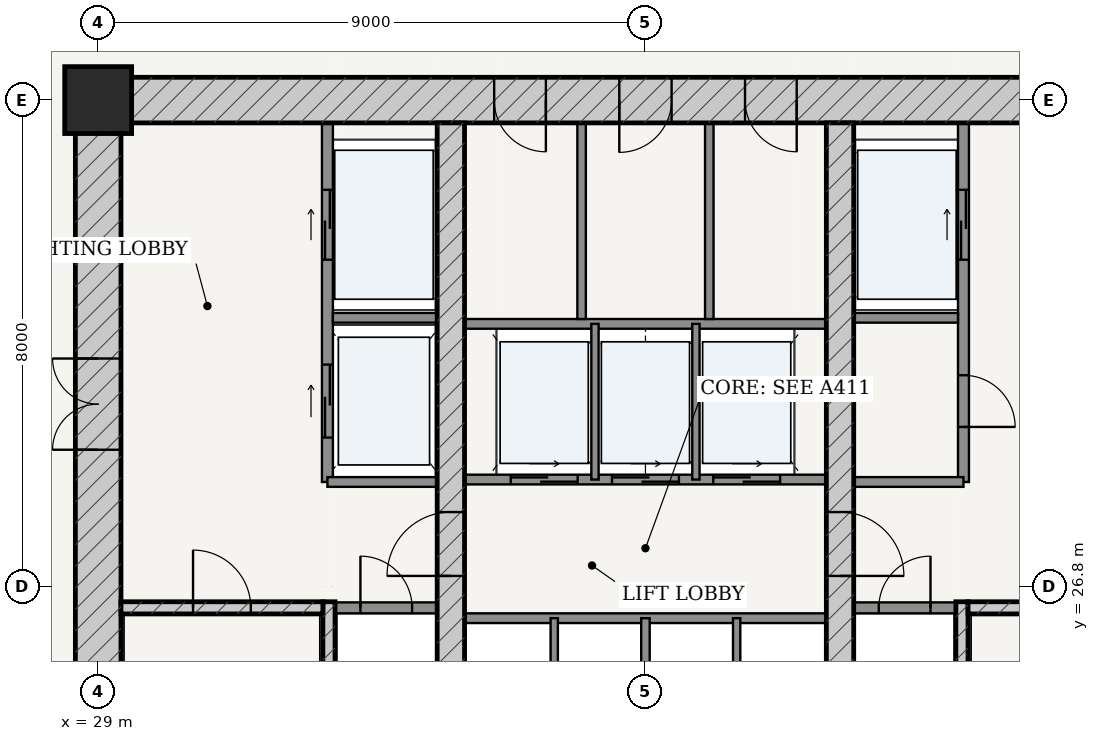
"""IFC4 building model, lengths in metres.
Left out: names, types, materials, properties, quantities, classifications, styles, units other than length and angle.
Written with IfcOpenShell. Run it as: python <this file> out.ifc"""

import sys

from ifc_helpers import new_model, si_unit, direction, frame, frame_2d, origin, origin_2d, place, context, subcontext, project, spatial, rectangle, extrude, source, transform, mapped, element, fill, save


model = new_model("IFC4")
c1 = context("Model", 3, precision=1e-05, world=origin(), true_north=direction((-0.2419218956, 0.970295726276)))
c2 = subcontext(c1, "Body", "Model", "MODEL_VIEW")
j1 = project(units=[si_unit("LENGTHUNIT", "METRE"), si_unit("PLANEANGLEUNIT", "RADIAN")], contexts=[c1])
p1 = place(None, origin())
s1 = spatial("IfcSite", under=j1, at=p1, CompositionType="ELEMENT")
p2 = place(p1, origin())
s2 = spatial("IfcBuilding", under=s1, at=p2, CompositionType="ELEMENT")
p3 = place(p2, frame((0.0, 0.0, 49.2)))
s3 = spatial("IfcBuildingStorey", under=s2, at=p3, CompositionType="ELEMENT", Elevation=49.2)
p4 = place(p3, frame((29.0, 34.8, 0.0), z_axis=(0.0, 0.0, 1.0), x_axis=(1.0, 0.0, 0.0)))
e1 = element("IfcColumn", 1, at=p4, inside=s3, PredefinedType="COLUMN", context=c2, shape_type="SweptSolid", body=[
    extrude(rectangle(XDim=1.1, YDim=1.1, at=origin_2d()), origin(), (0.0, 0.0, 1.0), 3.6),
])
p5 = place(p3, frame((28.625, 34.8, 0.0), z_axis=(0.0, 0.0, 1.0), x_axis=(1.0, 0.0, 0.0)))
e2 = element("IfcWall", 2, at=p5, inside=s3, PredefinedType="SHEAR", context=c2, shape_type="SweptSolid", body=[
    extrude(rectangle(XDim=18.75, YDim=0.75, at=frame_2d((9.375, 0.0))), origin(), (0.0, 0.0, 1.0), 3.32),
])
p6 = place(p5, frame((6.887, 0.0, 0.0)))
e3 = element("IfcOpeningElement", 3, at=p6, cuts=e2, PredefinedType="OPENING", context=c2, shape_type="SweptSolid", body=[
    extrude(rectangle(XDim=0.85, YDim=2.1, at=frame_2d((0.425, 1.05))), frame((0.0, 0.385, 0.0), z_axis=(0.0, -1.0, 0.0), x_axis=(1.0, 0.0, 0.0)), (0.0, 0.0, 1.0), 0.77),
])
p7 = place(p5, frame((8.945, 0.0, 0.0)))
e4 = element("IfcOpeningElement", 4, at=p7, cuts=e2, PredefinedType="OPENING", context=c2, shape_type="SweptSolid", body=[
    extrude(rectangle(XDim=0.86, YDim=2.1, at=frame_2d((0.43, 1.05))), frame((0.0, 0.385, 0.0), z_axis=(0.0, -1.0, 0.0), x_axis=(1.0, 0.0, 0.0)), (0.0, 0.0, 1.0), 0.77),
])
p8 = place(p5, frame((11.012, 0.0, 0.0)))
e5 = element("IfcOpeningElement", 5, at=p8, cuts=e2, PredefinedType="OPENING", context=c2, shape_type="SweptSolid", body=[
    extrude(rectangle(XDim=0.85, YDim=2.1, at=frame_2d((0.425, 1.05))), frame((0.0, 0.385, 0.0), z_axis=(0.0, -1.0, 0.0), x_axis=(1.0, 0.0, 0.0)), (0.0, 0.0, 1.0), 0.77),
])
p9 = place(p3, frame((29.0, 19.175, 0.0), z_axis=(0.0, 0.0, 1.0), x_axis=(0.0, 1.0, 0.0)))
e6 = element("IfcWall", 6, at=p9, inside=s3, PredefinedType="SHEAR", context=c2, shape_type="SweptSolid", body=[
    extrude(rectangle(XDim=15.25, YDim=0.75, at=frame_2d((7.625, 0.0))), origin(), (0.0, 0.0, 1.0), 3.32),
])
p10 = place(p9, frame((9.875, 0.0, 0.0)))
e7 = element("IfcOpeningElement", 7, at=p10, cuts=e6, PredefinedType="OPENING", context=c2, shape_type="SweptSolid", body=[
    extrude(rectangle(XDim=1.5, YDim=2.2, at=frame_2d((0.75, 1.1))), frame((0.0, 0.385, 0.0), z_axis=(0.0, -1.0, 0.0), x_axis=(1.0, 0.0, 0.0)), (0.0, 0.0, 1.0), 0.77),
])
p11 = place(p3, frame((32.795, 19.175, 0.0), z_axis=(0.0, 0.0, 1.0), x_axis=(0.0, 1.0, 0.0)))
e8 = element("IfcWall", 8, at=p11, inside=s3, PredefinedType="SOLIDWALL", context=c2, shape_type="SweptSolid", body=[
    extrude(rectangle(XDim=7.375, YDim=0.2, at=frame_2d((3.688, 0.0))), origin(), (0.0, 0.0, 1.0), 3.32),
])
p12 = place(p3, frame((29.375, 26.45, 0.0), z_axis=(0.0, 0.0, 1.0), x_axis=(1.0, 0.0, 0.0)))
e9 = element("IfcWall", 9, at=p12, inside=s3, PredefinedType="SOLIDWALL", context=c2, shape_type="SweptSolid", body=[
    extrude(rectangle(XDim=3.32, YDim=0.2, at=frame_2d((1.66, 0.0))), origin(), (0.0, 0.0, 1.0), 3.32),
])
p13 = place(p12, frame((1.185, 0.0, 0.0)))
e10 = element("IfcOpeningElement", 10, at=p13, cuts=e9, PredefinedType="OPENING", context=c2, shape_type="SweptSolid", body=[
    extrude(rectangle(XDim=0.95, YDim=2.15, at=frame_2d((0.475, 1.075))), frame((0.0, 0.11, 0.0), z_axis=(0.0, -1.0, 0.0), x_axis=(1.0, 0.0, 0.0)), (0.0, 0.0, 1.0), 0.22),
])
p14 = place(p3, frame((43.205, 19.175, 0.0), z_axis=(0.0, 0.0, 1.0), x_axis=(0.0, 1.0, 0.0)))
e11 = element("IfcWall", 11, at=p14, inside=s3, PredefinedType="SOLIDWALL", context=c2, shape_type="SweptSolid", body=[
    extrude(rectangle(XDim=7.375, YDim=0.2, at=frame_2d((3.688, 0.0))), origin(), (0.0, 0.0, 1.0), 3.32),
])
p15 = place(p3, frame((43.305, 26.45, 0.0), z_axis=(0.0, 0.0, 1.0), x_axis=(1.0, 0.0, 0.0)))
e12 = element("IfcWall", 12, at=p15, inside=s3, PredefinedType="SOLIDWALL", context=c2, shape_type="SweptSolid", body=[
    extrude(rectangle(XDim=3.32, YDim=0.2, at=frame_2d((1.66, 0.0))), origin(), (0.0, 0.0, 1.0), 3.32),
])
p16 = place(p15, frame((1.185, 0.0, 0.0)))
e13 = element("IfcOpeningElement", 13, at=p16, cuts=e12, PredefinedType="OPENING", context=c2, shape_type="SweptSolid", body=[
    extrude(rectangle(XDim=0.95, YDim=2.15, at=frame_2d((0.475, 1.075))), frame((0.0, 0.11, 0.0), z_axis=(0.0, -1.0, 0.0), x_axis=(1.0, 0.0, 0.0)), (0.0, 0.0, 1.0), 0.22),
])
p17 = place(p3, frame((34.8, 19.175, 0.0), z_axis=(0.0, 0.0, 1.0), x_axis=(0.0, 1.0, 0.0)))
e14 = element("IfcWall", 14, at=p17, inside=s3, PredefinedType="SHEAR", context=c2, shape_type="SweptSolid", body=[
    extrude(rectangle(XDim=15.25, YDim=0.45, at=frame_2d((7.625, 0.0))), origin(), (0.0, 0.0, 1.0), 3.32),
])
p18 = place(p17, frame((7.8, 0.0, 0.0)))
e15 = element("IfcOpeningElement", 15, at=p18, cuts=e14, PredefinedType="OPENING", context=c2, shape_type="SweptSolid", body=[
    extrude(rectangle(XDim=1.05, YDim=2.15, at=frame_2d((0.525, 1.075))), frame((0.0, 0.235, 0.0), z_axis=(0.0, -1.0, 0.0), x_axis=(1.0, 0.0, 0.0)), (0.0, 0.0, 1.0), 0.47),
])
p19 = place(p3, frame((41.2, 19.175, 0.0), z_axis=(0.0, 0.0, 1.0), x_axis=(0.0, 1.0, 0.0)))
e16 = element("IfcWall", 16, at=p19, inside=s3, PredefinedType="SHEAR", context=c2, shape_type="SweptSolid", body=[
    extrude(rectangle(XDim=15.25, YDim=0.45, at=frame_2d((7.625, 0.0))), origin(), (0.0, 0.0, 1.0), 3.32),
])
p20 = place(p19, frame((7.8, 0.0, 0.0)))
e17 = element("IfcOpeningElement", 17, at=p20, cuts=e16, PredefinedType="OPENING", context=c2, shape_type="SweptSolid", body=[
    extrude(rectangle(XDim=1.05, YDim=2.15, at=frame_2d((0.525, 1.075))), frame((0.0, 0.235, 0.0), z_axis=(0.0, -1.0, 0.0), x_axis=(1.0, 0.0, 0.0)), (0.0, 0.0, 1.0), 0.47),
])
p21 = place(p3, frame((32.9, 26.45, 0.0), z_axis=(0.0, 0.0, 1.0), x_axis=(1.0, 0.0, 0.0)))
e18 = element("IfcWall", 18, at=p21, inside=s3, PredefinedType="PARTITIONING", context=c2, shape_type="SweptSolid", body=[
    extrude(rectangle(XDim=1.675, YDim=0.18, at=frame_2d((0.837, 0.0))), origin(), (0.0, 0.0, 1.0), 3.32),
])
p22 = place(p21, frame((0.413, 0.0, 0.0)))
e19 = element("IfcOpeningElement", 19, at=p22, cuts=e18, PredefinedType="OPENING", context=c2, shape_type="SweptSolid", body=[
    extrude(rectangle(XDim=0.85, YDim=2.1, at=frame_2d((0.425, 1.05))), frame((0.0, 0.1, 0.0), z_axis=(0.0, -1.0, 0.0), x_axis=(1.0, 0.0, 0.0)), (0.0, 0.0, 1.0), 0.2),
])
p23 = place(p3, frame((41.425, 26.45, 0.0), z_axis=(0.0, 0.0, 1.0), x_axis=(1.0, 0.0, 0.0)))
e20 = element("IfcWall", 20, at=p23, inside=s3, PredefinedType="PARTITIONING", context=c2, shape_type="SweptSolid", body=[
    extrude(rectangle(XDim=1.675, YDim=0.18, at=frame_2d((0.837, 0.0))), origin(), (0.0, 0.0, 1.0), 3.32),
])
p24 = place(p23, frame((0.413, 0.0, 0.0)))
e21 = element("IfcOpeningElement", 21, at=p24, cuts=e20, PredefinedType="OPENING", context=c2, shape_type="SweptSolid", body=[
    extrude(rectangle(XDim=0.85, YDim=2.1, at=frame_2d((0.425, 1.05))), frame((0.0, 0.1, 0.0), z_axis=(0.0, -1.0, 0.0), x_axis=(1.0, 0.0, 0.0)), (0.0, 0.0, 1.0), 0.2),
])
p25 = place(p3, frame((32.77, 28.52, 0.0), z_axis=(0.0, 0.0, 1.0), x_axis=(0.0, 1.0, 0.0)))
e22 = element("IfcWall", 22, at=p25, inside=s3, PredefinedType="PARTITIONING", context=c2, shape_type="SweptSolid", body=[
    extrude(rectangle(XDim=5.905, YDim=0.18, at=frame_2d((2.953, 0.0))), origin(), (0.0, 0.0, 1.0), 3.32),
])
p26 = place(p25, frame((3.655, 0.0, 0.0)))
e23 = element("IfcOpeningElement", 23, at=p26, cuts=e22, PredefinedType="OPENING", context=c2, shape_type="SweptSolid", body=[
    extrude(rectangle(XDim=1.15, YDim=2.2, at=frame_2d((0.575, 1.1))), frame((0.0, 0.1, 0.0), z_axis=(0.0, -1.0, 0.0), x_axis=(1.0, 0.0, 0.0)), (0.0, 0.0, 1.0), 0.2),
])
p27 = place(p25, frame((0.73, 0.0, 0.0)))
e24 = element("IfcOpeningElement", 24, at=p27, cuts=e22, PredefinedType="OPENING", context=c2, shape_type="SweptSolid", body=[
    extrude(rectangle(XDim=1.2, YDim=2.25, at=frame_2d((0.6, 1.125))), frame((0.0, 0.1, 0.0), z_axis=(0.0, -1.0, 0.0), x_axis=(1.0, 0.0, 0.0)), (0.0, 0.0, 1.0), 0.2),
])
p28 = place(p3, frame((32.86, 31.22, 0.0), z_axis=(0.0, 0.0, 1.0), x_axis=(1.0, 0.0, 0.0)))
e25 = element("IfcWall", 25, at=p28, inside=s3, PredefinedType="PARTITIONING", context=c2, shape_type="SweptSolid", body=[
    extrude(rectangle(XDim=1.715, YDim=0.16, at=frame_2d((0.857, 0.0))), origin(), (0.0, 0.0, 1.0), 3.32),
])
p29 = place(p3, frame((32.77, 28.52, 0.0), z_axis=(0.0, 0.0, 1.0), x_axis=(1.0, 0.0, 0.0)))
e26 = element("IfcWall", 26, at=p29, inside=s3, PredefinedType="PARTITIONING", context=c2, shape_type="SweptSolid", body=[
    extrude(rectangle(XDim=1.805, YDim=0.16, at=frame_2d((0.902, 0.0))), origin(), (0.0, 0.0, 1.0), 3.32),
])
p30 = place(p3, frame((43.23, 28.52, 0.0), z_axis=(0.0, 0.0, 1.0), x_axis=(0.0, 1.0, 0.0)))
e27 = element("IfcWall", 27, at=p30, inside=s3, PredefinedType="PARTITIONING", context=c2, shape_type="SweptSolid", body=[
    extrude(rectangle(XDim=5.905, YDim=0.18, at=frame_2d((2.953, 0.0))), origin(), (0.0, 0.0, 1.0), 3.32),
])
p31 = place(p30, frame((0.905, 0.0, 0.0)))
e28 = element("IfcOpeningElement", 28, at=p31, cuts=e27, PredefinedType="OPENING", context=c2, shape_type="SweptSolid", body=[
    extrude(rectangle(XDim=0.85, YDim=2.1, at=frame_2d((0.425, 1.05))), frame((0.0, 0.1, 0.0), z_axis=(0.0, -1.0, 0.0), x_axis=(1.0, 0.0, 0.0)), (0.0, 0.0, 1.0), 0.2),
])
p32 = place(p30, frame((3.655, 0.0, 0.0)))
e29 = element("IfcOpeningElement", 29, at=p32, cuts=e27, PredefinedType="OPENING", context=c2, shape_type="SweptSolid", body=[
    extrude(rectangle(XDim=1.15, YDim=2.2, at=frame_2d((0.575, 1.1))), frame((0.0, 0.1, 0.0), z_axis=(0.0, -1.0, 0.0), x_axis=(1.0, 0.0, 0.0)), (0.0, 0.0, 1.0), 0.2),
])
p33 = place(p3, frame((41.425, 31.22, 0.0), z_axis=(0.0, 0.0, 1.0), x_axis=(1.0, 0.0, 0.0)))
e30 = element("IfcWall", 30, at=p33, inside=s3, PredefinedType="PARTITIONING", context=c2, shape_type="SweptSolid", body=[
    extrude(rectangle(XDim=1.715, YDim=0.16, at=frame_2d((0.857, 0.0))), origin(), (0.0, 0.0, 1.0), 3.32),
])
p34 = place(p3, frame((41.425, 28.52, 0.0), z_axis=(0.0, 0.0, 1.0), x_axis=(1.0, 0.0, 0.0)))
e31 = element("IfcWall", 31, at=p34, inside=s3, PredefinedType="PARTITIONING", context=c2, shape_type="SweptSolid", body=[
    extrude(rectangle(XDim=1.805, YDim=0.16, at=frame_2d((0.902, 0.0))), origin(), (0.0, 0.0, 1.0), 3.32),
])
p35 = place(p3, frame((35.025, 28.56, 0.0), z_axis=(0.0, 0.0, 1.0), x_axis=(1.0, 0.0, 0.0)))
e32 = element("IfcWall", 32, at=p35, inside=s3, PredefinedType="PARTITIONING", context=c2, shape_type="SweptSolid", body=[
    extrude(rectangle(XDim=5.95, YDim=0.16, at=frame_2d((2.975, 0.0))), origin(), (0.0, 0.0, 1.0), 3.32),
])
p36 = place(p35, frame((0.76, 0.0, 0.0)))
e33 = element("IfcOpeningElement", 33, at=p36, cuts=e32, PredefinedType="OPENING", context=c2, shape_type="SweptSolid", body=[
    extrude(rectangle(XDim=1.1, YDim=2.2, at=frame_2d((0.55, 1.1))), frame((0.0, 0.09, 0.0), z_axis=(0.0, -1.0, 0.0), x_axis=(1.0, 0.0, 0.0)), (0.0, 0.0, 1.0), 0.18),
])
p37 = place(p35, frame((2.425, 0.0, 0.0)))
e34 = element("IfcOpeningElement", 34, at=p37, cuts=e32, PredefinedType="OPENING", context=c2, shape_type="SweptSolid", body=[
    extrude(rectangle(XDim=1.1, YDim=2.2, at=frame_2d((0.55, 1.1))), frame((0.0, 0.09, 0.0), z_axis=(0.0, -1.0, 0.0), x_axis=(1.0, 0.0, 0.0)), (0.0, 0.0, 1.0), 0.18),
])
p38 = place(p35, frame((4.09, 0.0, 0.0)))
e35 = element("IfcOpeningElement", 35, at=p38, cuts=e32, PredefinedType="OPENING", context=c2, shape_type="SweptSolid", body=[
    extrude(rectangle(XDim=1.1, YDim=2.2, at=frame_2d((0.55, 1.1))), frame((0.0, 0.09, 0.0), z_axis=(0.0, -1.0, 0.0), x_axis=(1.0, 0.0, 0.0)), (0.0, 0.0, 1.0), 0.18),
])
p39 = place(p3, frame((35.025, 31.12, 0.0), z_axis=(0.0, 0.0, 1.0), x_axis=(1.0, 0.0, 0.0)))
e36 = element("IfcWall", 36, at=p39, inside=s3, PredefinedType="PARTITIONING", context=c2, shape_type="SweptSolid", body=[
    extrude(rectangle(XDim=5.95, YDim=0.16, at=frame_2d((2.975, 0.0))), origin(), (0.0, 0.0, 1.0), 3.32),
])
for number, where, z_axis, x_axis in (
    (37, (37.17, 28.56, 0.0), (0.0, 0.0, 1.0), (0.0, 1.0, 0.0)),
    (38, (38.83, 28.56, 0.0), (0.0, 0.0, 1.0), (0.0, 1.0, 0.0)),
):
    element("IfcWall", number, at=place(p3, frame(where, z_axis=z_axis, x_axis=x_axis)), inside=s3, PredefinedType="PARTITIONING", context=c2, shape_type="SweptSolid", body=[
        extrude(rectangle(XDim=2.56, YDim=0.12, at=frame_2d((1.28, 0.0))), origin(), (0.0, 0.0, 1.0), 3.32),
    ])
for number, where, z_axis, x_axis in (
    (39, (36.95, 31.2, 0.0), (0.0, 0.0, 1.0), (0.0, 1.0, 0.0)),
    (40, (39.05, 31.2, 0.0), (0.0, 0.0, 1.0), (0.0, 1.0, 0.0)),
):
    element("IfcWall", number, at=place(p3, frame(where, z_axis=z_axis, x_axis=x_axis)), inside=s3, PredefinedType="PARTITIONING", context=c2, shape_type="SweptSolid", body=[
        extrude(rectangle(XDim=3.225, YDim=0.14, at=frame_2d((1.613, 0.0))), origin(), (0.0, 0.0, 1.0), 3.32),
    ])
p40 = place(p3, frame((35.025, 26.28, 0.0), z_axis=(0.0, 0.0, 1.0), x_axis=(1.0, 0.0, 0.0)))
e41 = element("IfcWall", 41, at=p40, inside=s3, PredefinedType="PARTITIONING", context=c2, shape_type="SweptSolid", body=[
    extrude(rectangle(XDim=5.95, YDim=0.16, at=frame_2d((2.975, 0.0))), origin(), (0.0, 0.0, 1.0), 3.32),
])
p41 = place(p3, frame((36.5, 23.72, 0.0), z_axis=(0.0, 0.0, 1.0), x_axis=(0.0, 1.0, 0.0)))
e42 = element("IfcWall", 42, at=p41, inside=s3, PredefinedType="PARTITIONING", context=c2, shape_type="SweptSolid", body=[
    extrude(rectangle(XDim=2.56, YDim=0.12, at=frame_2d((1.28, 0.0))), origin(), (0.0, 0.0, 1.0), 3.32),
])
p42 = place(p3, frame((38.0, 23.72, 0.0), z_axis=(0.0, 0.0, 1.0), x_axis=(0.0, 1.0, 0.0)))
e43 = element("IfcWall", 43, at=p42, inside=s3, PredefinedType="PARTITIONING", context=c2, shape_type="SweptSolid", body=[
    extrude(rectangle(XDim=2.56, YDim=0.14, at=frame_2d((1.28, 0.0))), origin(), (0.0, 0.0, 1.0), 3.32),
])
p43 = place(p3, frame((39.5, 23.72, 0.0), z_axis=(0.0, 0.0, 1.0), x_axis=(0.0, 1.0, 0.0)))
e44 = element("IfcWall", 44, at=p43, inside=s3, PredefinedType="PARTITIONING", context=c2, shape_type="SweptSolid", body=[
    extrude(rectangle(XDim=2.56, YDim=0.12, at=frame_2d((1.28, 0.0))), origin(), (0.0, 0.0, 1.0), 3.32),
])
m1 = source(origin(), c2, "Body", "SweptSolid", [
    extrude(rectangle(XDim=1.5, YDim=2.2, at=frame_2d((0.75, 1.1))), frame((0.0, 0.025, 0.0), z_axis=(0.0, -1.0, 0.0), x_axis=(1.0, 0.0, 0.0)), (0.0, 0.0, 1.0), 0.05),
])
p44 = place(p10, origin())
e45 = element("IfcDoor", 45, at=p44, inside=s3, OperationType="DOUBLE_DOOR_SINGLE_SWING", PredefinedType="DOOR", context=c2, shape_type="MappedRepresentation", body=[
    mapped(m1, transform((0.0, 0.0, 0.0), scale=1.0)),
])
fill(e7, e45)
m2 = source(origin(), c2, "Body", "SweptSolid", [
    extrude(rectangle(XDim=1.05, YDim=2.15, at=frame_2d((0.525, 1.075))), frame((0.0, 0.025, 0.0), z_axis=(0.0, -1.0, 0.0), x_axis=(1.0, 0.0, 0.0)), (0.0, 0.0, 1.0), 0.05),
])
p45 = place(p18, origin())
e46 = element("IfcDoor", 46, at=p45, inside=s3, OperationType="SINGLE_SWING_LEFT", PredefinedType="DOOR", context=c2, shape_type="MappedRepresentation", body=[
    mapped(m2, transform((0.0, 0.0, 0.0), scale=1.0)),
])
fill(e15, e46)
p46 = place(p20, frame((1.05, 0.0, 0.0), z_axis=(0.0, 0.0, 1.0), x_axis=(-1.0, 0.0, 0.0)))
e47 = element("IfcDoor", 47, at=p46, inside=s3, OperationType="SINGLE_SWING_RIGHT", PredefinedType="DOOR", context=c2, shape_type="MappedRepresentation", body=[
    mapped(m2, transform((0.0, 0.0, 0.0), scale=1.0)),
])
fill(e17, e47)
m3 = source(origin(), c2, "Body", "SweptSolid", [
    extrude(rectangle(XDim=0.95, YDim=2.15, at=frame_2d((0.475, 1.075))), frame((0.0, 0.025, 0.0), z_axis=(0.0, -1.0, 0.0), x_axis=(1.0, 0.0, 0.0)), (0.0, 0.0, 1.0), 0.05),
])
p47 = place(p13, origin())
e48 = element("IfcDoor", 48, at=p47, inside=s3, OperationType="SINGLE_SWING_LEFT", PredefinedType="DOOR", context=c2, shape_type="MappedRepresentation", body=[
    mapped(m3, transform((0.0, 0.0, 0.0), scale=1.0)),
])
fill(e10, e48)
m4 = source(origin(), c2, "Body", "SweptSolid", [
    extrude(rectangle(XDim=0.85, YDim=2.1, at=frame_2d((0.425, 1.05))), frame((0.0, 0.025, 0.0), z_axis=(0.0, -1.0, 0.0), x_axis=(1.0, 0.0, 0.0)), (0.0, 0.0, 1.0), 0.05),
])
p48 = place(p22, origin())
e49 = element("IfcDoor", 49, at=p48, inside=s3, OperationType="SINGLE_SWING_LEFT", PredefinedType="DOOR", context=c2, shape_type="MappedRepresentation", body=[
    mapped(m4, transform((0.0, 0.0, 0.0), scale=1.0)),
])
fill(e19, e49)
p49 = place(p24, origin())
e50 = element("IfcDoor", 50, at=p49, inside=s3, OperationType="SINGLE_SWING_RIGHT", PredefinedType="DOOR", context=c2, shape_type="MappedRepresentation", body=[
    mapped(m4, transform((0.0, 0.0, 0.0), scale=1.0)),
])
fill(e21, e50)
p50 = place(p31, frame((0.85, 0.0, 0.0), z_axis=(0.0, 0.0, 1.0), x_axis=(-1.0, 0.0, 0.0)))
e51 = element("IfcDoor", 51, at=p50, inside=s3, OperationType="SINGLE_SWING_RIGHT", PredefinedType="DOOR", context=c2, shape_type="MappedRepresentation", body=[
    mapped(m4, transform((0.0, 0.0, 0.0), scale=1.0)),
])
fill(e28, e51)
p51 = place(p6, frame((0.85, 0.0, 0.0), z_axis=(0.0, 0.0, 1.0), x_axis=(-1.0, 0.0, 0.0)))
e52 = element("IfcDoor", 52, at=p51, inside=s3, OperationType="SINGLE_SWING_LEFT", PredefinedType="DOOR", context=c2, shape_type="MappedRepresentation", body=[
    mapped(m4, transform((0.0, 0.0, 0.0), scale=1.0)),
])
fill(e3, e52)
m5 = source(origin(), c2, "Body", "SweptSolid", [
    extrude(rectangle(XDim=0.86, YDim=2.1, at=frame_2d((0.43, 1.05))), frame((0.0, 0.025, 0.0), z_axis=(0.0, -1.0, 0.0), x_axis=(1.0, 0.0, 0.0)), (0.0, 0.0, 1.0), 0.05),
])
p52 = place(p7, frame((0.86, 0.0, 0.0), z_axis=(0.0, 0.0, 1.0), x_axis=(-1.0, 0.0, 0.0)))
e53 = element("IfcDoor", 53, at=p52, inside=s3, OperationType="SINGLE_SWING_RIGHT", PredefinedType="DOOR", context=c2, shape_type="MappedRepresentation", body=[
    mapped(m5, transform((0.0, 0.0, 0.0), scale=1.0)),
])
fill(e4, e53)
p53 = place(p8, frame((0.85, 0.0, 0.0), z_axis=(0.0, 0.0, 1.0), x_axis=(-1.0, 0.0, 0.0)))
e54 = element("IfcDoor", 54, at=p53, inside=s3, OperationType="SINGLE_SWING_LEFT", PredefinedType="DOOR", context=c2, shape_type="MappedRepresentation", body=[
    mapped(m4, transform((0.0, 0.0, 0.0), scale=1.0)),
])
fill(e5, e54)
m6 = source(origin(), c2, "Body", "SweptSolid", [
    extrude(rectangle(XDim=1.15, YDim=2.2, at=frame_2d((0.575, 1.1))), frame((0.0, 0.025, 0.0), z_axis=(0.0, -1.0, 0.0), x_axis=(1.0, 0.0, 0.0)), (0.0, 0.0, 1.0), 0.05),
])
p54 = place(p26, origin())
e55 = element("IfcDoor", 55, at=p54, inside=s3, OperationType="DOUBLE_DOOR_SLIDING", PredefinedType="DOOR", context=c2, shape_type="MappedRepresentation", body=[
    mapped(m6, transform((0.0, 0.0, 0.0), scale=1.0)),
])
fill(e23, e55)
p55 = place(p32, origin())
e56 = element("IfcDoor", 56, at=p55, inside=s3, OperationType="DOUBLE_DOOR_SLIDING", PredefinedType="DOOR", context=c2, shape_type="MappedRepresentation", body=[
    mapped(m6, transform((0.0, 0.0, 0.0), scale=1.0)),
])
fill(e29, e56)
m7 = source(origin(), c2, "Body", "SweptSolid", [
    extrude(rectangle(XDim=1.2, YDim=2.25, at=frame_2d((0.6, 1.125))), frame((0.0, 0.025, 0.0), z_axis=(0.0, -1.0, 0.0), x_axis=(1.0, 0.0, 0.0)), (0.0, 0.0, 1.0), 0.05),
])
p56 = place(p27, origin())
e57 = element("IfcDoor", 57, at=p56, inside=s3, OperationType="DOUBLE_DOOR_SLIDING", PredefinedType="DOOR", context=c2, shape_type="MappedRepresentation", body=[
    mapped(m7, transform((0.0, 0.0, 0.0), scale=1.0)),
])
fill(e24, e57)
m8 = source(origin(), c2, "Body", "SweptSolid", [
    extrude(rectangle(XDim=1.1, YDim=2.2, at=frame_2d((0.55, 1.1))), frame((0.0, 0.025, 0.0), z_axis=(0.0, -1.0, 0.0), x_axis=(1.0, 0.0, 0.0)), (0.0, 0.0, 1.0), 0.05),
])
p57 = place(p36, origin())
e58 = element("IfcDoor", 58, at=p57, inside=s3, OperationType="DOUBLE_DOOR_SLIDING", PredefinedType="DOOR", context=c2, shape_type="MappedRepresentation", body=[
    mapped(m8, transform((0.0, 0.0, 0.0), scale=1.0)),
])
fill(e33, e58)
p58 = place(p37, origin())
e59 = element("IfcDoor", 59, at=p58, inside=s3, OperationType="DOUBLE_DOOR_SLIDING", PredefinedType="DOOR", context=c2, shape_type="MappedRepresentation", body=[
    mapped(m8, transform((0.0, 0.0, 0.0), scale=1.0)),
])
fill(e34, e59)
p59 = place(p38, origin())
e60 = element("IfcDoor", 60, at=p59, inside=s3, OperationType="DOUBLE_DOOR_SLIDING", PredefinedType="DOOR", context=c2, shape_type="MappedRepresentation", body=[
    mapped(m8, transform((0.0, 0.0, 0.0), scale=1.0)),
])
fill(e35, e60)
save(model, sys.argv[1])
